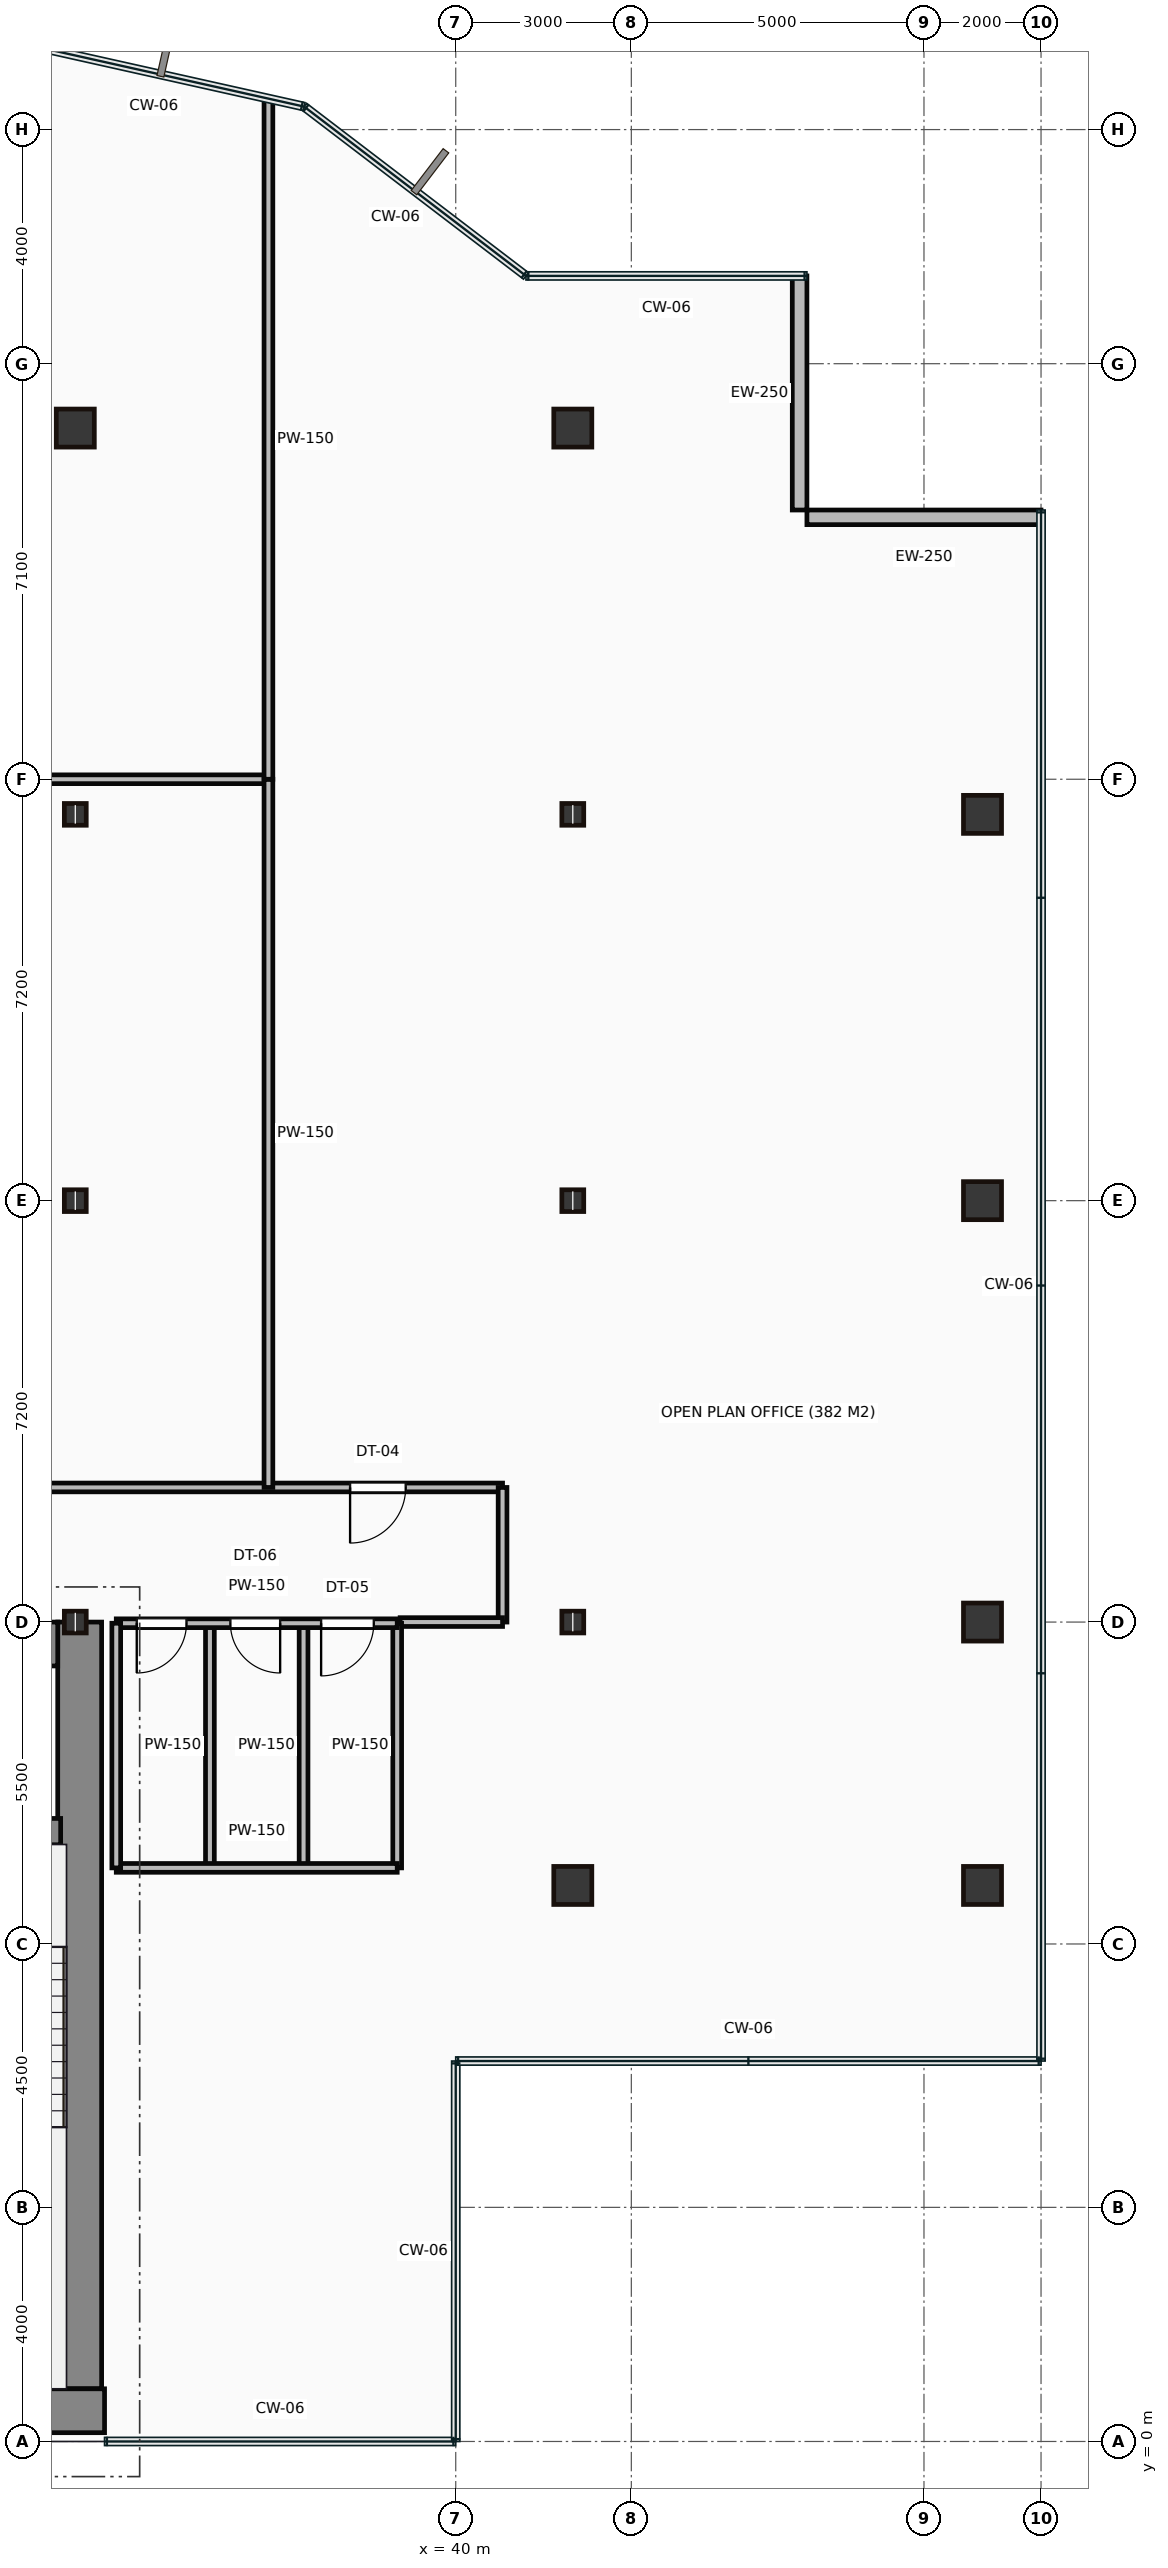
"""IFC4 building model, lengths in metres.
Left out: names, types, materials, properties, quantities, classifications, styles, units other than length and angle.
Written with IfcOpenShell. Run it as: python <this file> out.ifc"""

import sys

from ifc_helpers import new_model, si_unit, direction, frame, frame_2d, origin, origin_2d, place, context, subcontext, project, spatial, rectangle, hollow_rectangle, i_section, extrude, source, transform, mapped, element, fill, save


model = new_model("IFC4")
c1 = context("Model", 3, precision=1e-05, world=origin(), true_north=direction((0.0, 1.0)))
c2 = subcontext(c1, "Body", "Model", "MODEL_VIEW")
j1 = project(units=[si_unit("LENGTHUNIT", "METRE"), si_unit("PLANEANGLEUNIT", "RADIAN")], contexts=[c1])
p1 = place(None, origin())
s1 = spatial("IfcSite", under=j1, at=p1, CompositionType="ELEMENT")
p2 = place(p1, origin())
s2 = spatial("IfcBuilding", under=s1, at=p2, CompositionType="ELEMENT")
p3 = place(p2, frame((0.0, 0.0, 184.4)))
s3 = spatial("IfcBuildingStorey", under=s2, at=p3, CompositionType="ELEMENT", Elevation=184.4)
m1 = source(origin(), c2, "Body", "SweptSolid", [
    extrude(rectangle(XDim=29.5, YDim=0.75, at=frame_2d((14.75, 0.0))), origin(), (0.0, 0.0, 1.0), 4.2),
])
p4 = place(p3, frame((4.5, 0.525, 0.0), z_axis=(0.0, 0.0, 1.0), x_axis=(1.0, 0.0, 0.0)))
e1 = element("IfcWall", 1, at=p4, inside=s3, PredefinedType="SHEAR", context=c2, shape_type="MappedRepresentation", body=[
    mapped(m1, transform((0.0, 0.0, 0.0))),
])
m2 = source(origin(), c2, "Body", "SweptSolid", [
    extrude(rectangle(XDim=13.1, YDim=0.75, at=frame_2d((6.55, 0.0))), origin(), (0.0, 0.0, 1.0), 4.2),
])
p5 = place(p3, frame((33.575, 0.9, 0.0), z_axis=(0.0, 0.0, 1.0), x_axis=(0.0, 1.0, 0.0)))
e2 = element("IfcWall", 2, at=p5, inside=s3, PredefinedType="SHEAR", context=c2, shape_type="MappedRepresentation", body=[
    mapped(m2, transform((0.0, 0.0, 0.0))),
])
m3 = source(origin(), c2, "Body", "SweptSolid", [
    extrude(rectangle(XDim=12.6, YDim=0.75, at=frame_2d((6.3, 0.0))), origin(), (0.0, 0.0, 1.0), 4.2),
])
p6 = place(p3, frame((20.6, 13.625, 0.0), z_axis=(0.0, 0.0, 1.0), x_axis=(1.0, 0.0, 0.0)))
e3 = element("IfcWall", 3, at=p6, inside=s3, PredefinedType="SHEAR", context=c2, shape_type="MappedRepresentation", body=[
    mapped(m3, transform((0.0, 0.0, 0.0))),
])
p7 = place(p6, frame((9.25, 0.0, 0.0)))
e4 = element("IfcOpeningElement", 4, at=p7, cuts=e3, PredefinedType="OPENING", context=c2, shape_type="SweptSolid", body=[
    extrude(rectangle(XDim=1.1, YDim=2.15, at=frame_2d((0.55, 1.075))), frame((0.0, 0.385, 0.0), z_axis=(0.0, -1.0, 0.0), x_axis=(1.0, 0.0, 0.0)), (0.0, 0.0, 1.0), 0.77),
])
m4 = source(origin(), c2, "Body", "SweptSolid", [
    extrude(rectangle(XDim=3.39, YDim=0.45, at=frame_2d((1.695, 0.0))), origin(), (0.0, 0.0, 1.0), 4.2),
])
p8 = place(p3, frame((29.86, 10.42, 0.0), z_axis=(0.0, 0.0, 1.0), x_axis=(1.0, 0.0, 0.0)))
e5 = element("IfcWall", 5, at=p8, inside=s3, PredefinedType="SHEAR", context=c2, shape_type="MappedRepresentation", body=[
    mapped(m4, transform((0.0, 0.0, 0.0))),
])
p9 = place(p8, frame((1.1, 0.0, 0.0)))
e6 = element("IfcOpeningElement", 6, at=p9, cuts=e5, PredefinedType="OPENING", context=c2, shape_type="SweptSolid", body=[
    extrude(rectangle(XDim=1.1, YDim=2.15, at=frame_2d((0.55, 1.075))), frame((0.0, 0.235, 0.0), z_axis=(0.0, -1.0, 0.0), x_axis=(1.0, 0.0, 0.0)), (0.0, 0.0, 1.0), 0.47),
])
m5 = source(origin(), c2, "Body", "SweptSolid", [
    extrude(i_section(OverallWidth=0.374, OverallDepth=0.372, WebThickness=0.016, FlangeThickness=0.026, at=origin_2d()), origin(), (0.0, 0.0, 1.0), 4.2),
])
for number, where, z_axis, x_axis in (
    (7, (33.5, 14.0, 0.0), (0.0, 0.0, 1.0), (1.0, 0.0, 0.0)),
    (8, (33.5, 21.2, 0.0), (0.0, 0.0, 1.0), (1.0, 0.0, 0.0)),
    (9, (33.5, 27.8, 0.0), (0.0, 0.0, 1.0), (1.0, 0.0, 0.0)),
):
    element("IfcColumn", number, at=place(p3, frame(where, z_axis=z_axis, x_axis=x_axis)), inside=s3, PredefinedType="COLUMN", context=c2, shape_type="MappedRepresentation", body=[
        mapped(m5, transform((0.0, 0.0, 0.0))),
    ])
m6 = source(origin(), c2, "Body", "SweptSolid", [
    extrude(hollow_rectangle(XDim=0.65, YDim=0.65, WallThickness=0.032, at=origin_2d()), origin(), (0.0, 0.0, 1.0), 4.2),
])
for number, where, z_axis, x_axis in (
    (10, (33.5, 34.4, 0.0), (0.0, 0.0, 1.0), (1.0, 0.0, 0.0)),
    (11, (42.0, 9.5, 0.0), (0.0, 0.0, 1.0), (1.0, 0.0, 0.0)),
):
    element("IfcColumn", number, at=place(p3, frame(where, z_axis=z_axis, x_axis=x_axis)), inside=s3, PredefinedType="COLUMN", context=c2, shape_type="MappedRepresentation", body=[
        mapped(m6, transform((0.0, 0.0, 0.0))),
    ])
for number, where, z_axis, x_axis in (
    (12, (42.0, 14.0, 0.0), (0.0, 0.0, 1.0), (1.0, 0.0, 0.0)),
    (13, (42.0, 21.2, 0.0), (0.0, 0.0, 1.0), (1.0, 0.0, 0.0)),
    (14, (42.0, 27.8, 0.0), (0.0, 0.0, 1.0), (1.0, 0.0, 0.0)),
):
    element("IfcColumn", number, at=place(p3, frame(where, z_axis=z_axis, x_axis=x_axis)), inside=s3, PredefinedType="COLUMN", context=c2, shape_type="MappedRepresentation", body=[
        mapped(m5, transform((0.0, 0.0, 0.0))),
    ])
for number, where, z_axis, x_axis in (
    (15, (42.0, 34.4, 0.0), (0.0, 0.0, 1.0), (1.0, 0.0, 0.0)),
    (16, (49.0, 9.5, 0.0), (0.0, 0.0, 1.0), (1.0, 0.0, 0.0)),
    (17, (49.0, 14.0, 0.0), (0.0, 0.0, 1.0), (1.0, 0.0, 0.0)),
    (18, (49.0, 21.2, 0.0), (0.0, 0.0, 1.0), (1.0, 0.0, 0.0)),
    (19, (49.0, 27.8, 0.0), (0.0, 0.0, 1.0), (1.0, 0.0, 0.0)),
):
    element("IfcColumn", number, at=place(p3, frame(where, z_axis=z_axis, x_axis=x_axis)), inside=s3, PredefinedType="COLUMN", context=c2, shape_type="MappedRepresentation", body=[
        mapped(m6, transform((0.0, 0.0, 0.0))),
    ])
m7 = source(origin(), c2, "Body", "SweptSolid", [
    extrude(rectangle(XDim=4.0, YDim=0.25, at=frame_2d((2.0, 0.0))), origin(), (0.0, 0.0, 1.0), 3.95),
])
for number, where, z_axis, x_axis in (
    (20, (50.0, 32.875, 0.0), (0.0, 0.0, 1.0), (-1.0, 0.0, 0.0)),
    (21, (45.875, 33.0, 0.0), (0.0, 0.0, 1.0), (0.0, 1.0, 0.0)),
):
    element("IfcWall", number, at=place(p3, frame(where, z_axis=z_axis, x_axis=x_axis)), inside=s3, PredefinedType="STANDARD", context=c2, shape_type="MappedRepresentation", body=[
        mapped(m7, transform((0.0, 0.0, 0.0))),
    ])
m8 = source(origin(), c2, "Body", "SweptSolid", [
    extrude(rectangle(XDim=4.8, YDim=0.15, at=frame_2d((2.4, 0.0))), origin(), (0.0, 0.0, 1.0), 2.895),
])
p10 = place(p3, frame((34.2, 13.98, 0.0), z_axis=(0.0, 0.0, 1.0), x_axis=(1.0, 0.0, 0.0)))
e22 = element("IfcWall", 22, at=p10, inside=s3, PredefinedType="PARTITIONING", context=c2, shape_type="MappedRepresentation", body=[
    mapped(m8, transform((0.0, 0.0, 0.0))),
])
p11 = place(p10, frame((0.35, 0.0, 0.0)))
e23 = element("IfcOpeningElement", 23, at=p11, cuts=e22, PredefinedType="OPENING", context=c2, shape_type="SweptSolid", body=[
    extrude(rectangle(XDim=0.85, YDim=2.1, at=frame_2d((0.425, 1.05))), frame((0.0, 0.085, 0.0), z_axis=(0.0, -1.0, 0.0), x_axis=(1.0, 0.0, 0.0)), (0.0, 0.0, 1.0), 0.17),
])
p12 = place(p10, frame((1.95, 0.0, 0.0)))
e24 = element("IfcOpeningElement", 24, at=p12, cuts=e22, PredefinedType="OPENING", context=c2, shape_type="SweptSolid", body=[
    extrude(rectangle(XDim=0.85, YDim=2.1, at=frame_2d((0.425, 1.05))), frame((0.0, 0.085, 0.0), z_axis=(0.0, -1.0, 0.0), x_axis=(1.0, 0.0, 0.0)), (0.0, 0.0, 1.0), 0.17),
])
p13 = place(p10, frame((3.5, 0.0, 0.0)))
e25 = element("IfcOpeningElement", 25, at=p13, cuts=e22, PredefinedType="OPENING", context=c2, shape_type="SweptSolid", body=[
    extrude(rectangle(XDim=0.9, YDim=2.1, at=frame_2d((0.45, 1.05))), frame((0.0, 0.085, 0.0), z_axis=(0.0, -1.0, 0.0), x_axis=(1.0, 0.0, 0.0)), (0.0, 0.0, 1.0), 0.17),
])
m9 = source(origin(), c2, "Body", "SweptSolid", [
    extrude(rectangle(XDim=4.8, YDim=0.15, at=frame_2d((2.4, 0.0))), origin(), (0.0, 0.0, 1.0), 3.95),
])
p14 = place(p3, frame((34.2, 9.8, 0.0), z_axis=(0.0, 0.0, 1.0), x_axis=(1.0, 0.0, 0.0)))
e26 = element("IfcWall", 26, at=p14, inside=s3, PredefinedType="PARTITIONING", context=c2, shape_type="MappedRepresentation", body=[
    mapped(m9, transform((0.0, 0.0, 0.0))),
])
m10 = source(origin(), c2, "Body", "SweptSolid", [
    extrude(rectangle(XDim=4.18, YDim=0.15, at=frame_2d((2.09, 0.0))), origin(), (0.0, 0.0, 1.0), 3.95),
])
for number, where, z_axis, x_axis in (
    (27, (39.0, 9.8, 0.0), (0.0, 0.0, 1.0), (0.0, 1.0, 0.0)),
    (28, (34.2, 9.8, 0.0), (0.0, 0.0, 1.0), (0.0, 1.0, 0.0)),
    (29, (35.8, 9.8, 0.0), (0.0, 0.0, 1.0), (0.0, 1.0, 0.0)),
    (30, (37.4, 9.8, 0.0), (0.0, 0.0, 1.0), (0.0, 1.0, 0.0)),
):
    element("IfcWall", number, at=place(p3, frame(where, z_axis=z_axis, x_axis=x_axis)), inside=s3, PredefinedType="PARTITIONING", context=c2, shape_type="MappedRepresentation", body=[
        mapped(m10, transform((0.0, 0.0, 0.0))),
    ])
m11 = source(origin(), c2, "Body", "SweptSolid", [
    extrude(rectangle(XDim=21.75, YDim=0.15, at=frame_2d((10.875, 0.0))), origin(), (0.0, 0.0, 1.0), 3.95),
])
p15 = place(p3, frame((19.05, 16.3, 0.0), z_axis=(0.0, 0.0, 1.0), x_axis=(1.0, 0.0, 0.0)))
e31 = element("IfcWall", 31, at=p15, inside=s3, PredefinedType="PARTITIONING", context=c2, shape_type="MappedRepresentation", body=[
    mapped(m11, transform((0.0, 0.0, 0.0))),
])
p16 = place(p15, frame((11.075, 0.0, 0.0)))
e32 = element("IfcOpeningElement", 32, at=p16, cuts=e31, PredefinedType="OPENING", context=c2, shape_type="SweptSolid", body=[
    extrude(rectangle(XDim=0.95, YDim=2.15, at=frame_2d((0.475, 1.075))), frame((0.0, 0.085, 0.0), z_axis=(0.0, -1.0, 0.0), x_axis=(1.0, 0.0, 0.0)), (0.0, 0.0, 1.0), 0.17),
])
p17 = place(p15, frame((19.145, 0.0, 0.0)))
e33 = element("IfcOpeningElement", 33, at=p17, cuts=e31, PredefinedType="OPENING", context=c2, shape_type="SweptSolid", body=[
    extrude(rectangle(XDim=0.95, YDim=2.15, at=frame_2d((0.475, 1.075))), frame((0.0, 0.085, 0.0), z_axis=(0.0, -1.0, 0.0), x_axis=(1.0, 0.0, 0.0)), (0.0, 0.0, 1.0), 0.17),
])
m12 = source(origin(), c2, "Body", "SweptSolid", [
    extrude(rectangle(XDim=2.3, YDim=0.15, at=frame_2d((1.15, 0.0))), origin(), (0.0, 0.0, 1.0), 3.95),
])
p18 = place(p3, frame((40.8, 16.3, 0.0), z_axis=(0.0, 0.0, 1.0), x_axis=(0.0, -1.0, 0.0)))
e34 = element("IfcWall", 34, at=p18, inside=s3, PredefinedType="PARTITIONING", context=c2, shape_type="MappedRepresentation", body=[
    mapped(m12, transform((0.0, 0.0, 0.0))),
])
m13 = source(origin(), c2, "Body", "SweptSolid", [
    extrude(rectangle(XDim=1.75, YDim=0.15, at=frame_2d((0.875, 0.0))), origin(), (0.0, 0.0, 1.0), 2.895),
])
p19 = place(p3, frame((40.8, 14.0, 0.0), z_axis=(0.0, 0.0, 1.0), x_axis=(-1.0, 0.0, 0.0)))
e35 = element("IfcWall", 35, at=p19, inside=s3, PredefinedType="PARTITIONING", context=c2, shape_type="MappedRepresentation", body=[
    mapped(m13, transform((0.0, 0.0, 0.0))),
])
m14 = source(origin(), c2, "Body", "SweptSolid", [
    extrude(rectangle(XDim=12.4, YDim=0.15, at=frame_2d((6.2, 0.0))), origin(), (0.0, 0.0, 1.0), 3.95),
])
p20 = place(p3, frame((36.8, 28.4, 0.0), z_axis=(0.0, 0.0, 1.0), x_axis=(-1.0, 0.0, 0.0)))
e36 = element("IfcWall", 36, at=p20, inside=s3, PredefinedType="PARTITIONING", context=c2, shape_type="MappedRepresentation", body=[
    mapped(m14, transform((0.0, 0.0, 0.0))),
])
m15 = source(origin(), c2, "Body", "SweptSolid", [
    extrude(rectangle(XDim=12.1, YDim=0.15, at=frame_2d((6.05, 0.0))), origin(), (0.0, 0.0, 1.0), 3.95),
])
p21 = place(p3, frame((36.8, 28.4, 0.0), z_axis=(0.0, 0.0, 1.0), x_axis=(0.0, -1.0, 0.0)))
e37 = element("IfcWall", 37, at=p21, inside=s3, PredefinedType="PARTITIONING", context=c2, shape_type="MappedRepresentation", body=[
    mapped(m15, transform((0.0, 0.0, 0.0))),
])
m16 = source(origin(), c2, "Body", "SweptSolid", [
    extrude(rectangle(XDim=11.608, YDim=0.15, at=frame_2d((5.804, 0.0))), origin(), (0.0, 0.0, 1.0), 3.95),
])
p22 = place(p3, frame((36.8, 40.008, 0.0), z_axis=(0.0, 0.0, 1.0), x_axis=(0.0, -1.0, 0.0)))
e38 = element("IfcWall", 38, at=p22, inside=s3, PredefinedType="PARTITIONING", context=c2, shape_type="MappedRepresentation", body=[
    mapped(m16, transform((0.0, 0.0, 0.0))),
])
m17 = source(origin(), c2, "Body", "SweptSolid", [
    extrude(rectangle(XDim=0.85, YDim=2.1, at=frame_2d((0.425, 1.05))), frame((0.0, 0.025, 0.0), z_axis=(0.0, -1.0, 0.0), x_axis=(1.0, 0.0, 0.0)), (0.0, 0.0, 1.0), 0.05),
])
p23 = place(p11, frame((0.85, 0.0, 0.0), z_axis=(0.0, 0.0, 1.0), x_axis=(-1.0, 0.0, 0.0)))
e39 = element("IfcDoor", 39, at=p23, inside=s3, OperationType="SINGLE_SWING_LEFT", PredefinedType="DOOR", context=c2, shape_type="MappedRepresentation", body=[
    mapped(m17, transform((0.0, 0.0, 0.0))),
])
fill(e23, e39)
p24 = place(p12, frame((0.85, 0.0, 0.0), z_axis=(0.0, 0.0, 1.0), x_axis=(-1.0, 0.0, 0.0)))
e40 = element("IfcDoor", 40, at=p24, inside=s3, OperationType="SINGLE_SWING_RIGHT", PredefinedType="DOOR", context=c2, shape_type="MappedRepresentation", body=[
    mapped(m17, transform((0.0, 0.0, 0.0))),
])
fill(e24, e40)
m18 = source(origin(), c2, "Body", "SweptSolid", [
    extrude(rectangle(XDim=0.9, YDim=2.1, at=frame_2d((0.45, 1.05))), frame((0.0, 0.025, 0.0), z_axis=(0.0, -1.0, 0.0), x_axis=(1.0, 0.0, 0.0)), (0.0, 0.0, 1.0), 0.05),
])
p25 = place(p13, frame((0.9, 0.0, 0.0), z_axis=(0.0, 0.0, 1.0), x_axis=(-1.0, 0.0, 0.0)))
e41 = element("IfcDoor", 41, at=p25, inside=s3, OperationType="SINGLE_SWING_LEFT", PredefinedType="DOOR", context=c2, shape_type="MappedRepresentation", body=[
    mapped(m18, transform((0.0, 0.0, 0.0))),
])
fill(e25, e41)
m19 = source(origin(), c2, "Body", "SweptSolid", [
    extrude(rectangle(XDim=0.95, YDim=2.15, at=frame_2d((0.475, 1.075))), frame((0.0, 0.025, 0.0), z_axis=(0.0, -1.0, 0.0), x_axis=(1.0, 0.0, 0.0)), (0.0, 0.0, 1.0), 0.05),
])
p26 = place(p17, origin())
e42 = element("IfcDoor", 42, at=p26, inside=s3, OperationType="SINGLE_SWING_LEFT", PredefinedType="DOOR", context=c2, shape_type="MappedRepresentation", body=[
    mapped(m19, transform((0.0, 0.0, 0.0))),
])
fill(e33, e42)
save(model, sys.argv[1])
